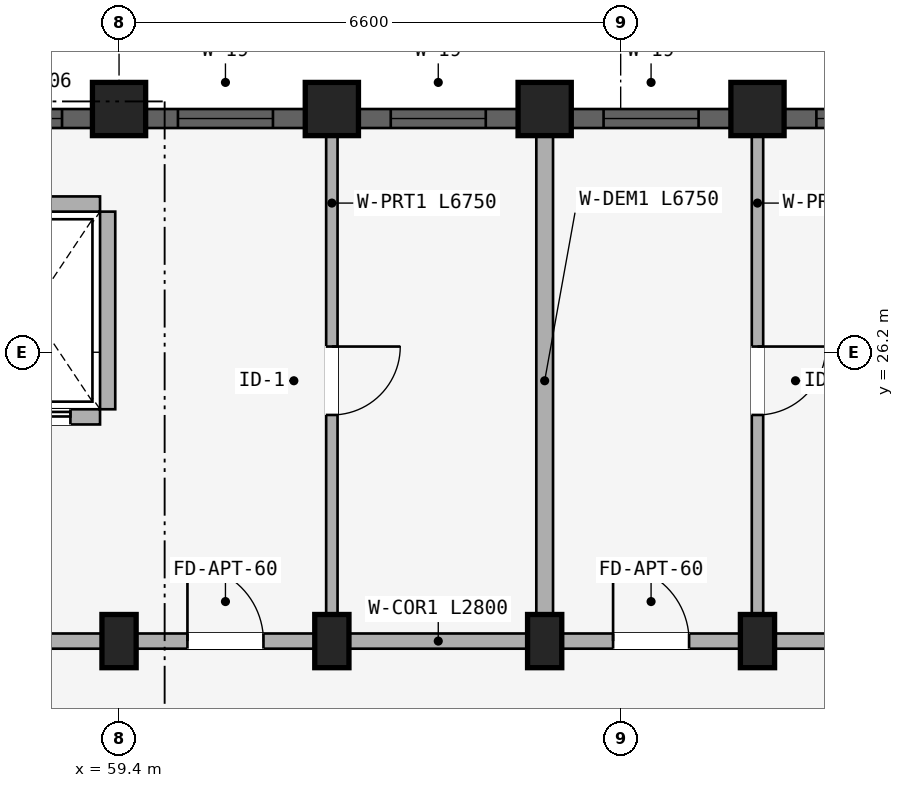
"""IFC4 building model, lengths in metres.
Left out: names, types, materials, properties, quantities, classifications, styles, units other than length and angle.
Written with IfcOpenShell. Run it as: python <this file> out.ifc"""

import sys

from ifc_helpers import new_model, si_unit, direction, frame, frame_2d, origin, origin_2d, place, context, subcontext, project, spatial, rectangle, extrude, element, fill, save


model = new_model("IFC4")
c1 = context("Model", 3, precision=1e-05, world=origin(), true_north=direction((0.0, 1.0)))
c2 = subcontext(c1, "Body", "Model", "MODEL_VIEW")
j1 = project(units=[si_unit("LENGTHUNIT", "METRE"), si_unit("PLANEANGLEUNIT", "RADIAN")], contexts=[c1])
p1 = place(None, origin())
s1 = spatial("IfcSite", under=j1, at=p1, CompositionType="ELEMENT")
p2 = place(p1, origin())
s2 = spatial("IfcBuilding", under=s1, at=p2, CompositionType="ELEMENT")
p3 = place(p2, frame((0.0, 0.0, 24.45)))
s3 = spatial("IfcBuildingStorey", under=s2, at=p3, CompositionType="ELEMENT", Elevation=24.45)
p4 = place(p3, frame((59.4, 29.4, 0.0), z_axis=(0.0, 0.0, 1.0), x_axis=(1.0, 0.0, 0.0)))
e1 = element("IfcColumn", 1, at=p4, inside=s3, PredefinedType="COLUMN", context=c2, shape_type="SweptSolid", body=[
    extrude(rectangle(XDim=0.7, YDim=0.7, at=origin_2d()), origin(), (0.0, 0.0, 1.0), 2.93),
])
p5 = place(p3, frame((59.4, 22.4, 0.0), z_axis=(0.0, 0.0, 1.0), x_axis=(1.0, 0.0, 0.0)))
e2 = element("IfcColumn", 2, at=p5, inside=s3, PredefinedType="COLUMN", context=c2, shape_type="SweptSolid", body=[
    extrude(rectangle(XDim=0.45, YDim=0.7, at=origin_2d()), origin(), (0.0, 0.0, 1.0), 2.93),
])
p6 = place(p3, frame((62.2, 29.4, 0.0), z_axis=(0.0, 0.0, 1.0), x_axis=(1.0, 0.0, 0.0)))
e3 = element("IfcColumn", 3, at=p6, inside=s3, PredefinedType="COLUMN", context=c2, shape_type="SweptSolid", body=[
    extrude(rectangle(XDim=0.7, YDim=0.7, at=origin_2d()), origin(), (0.0, 0.0, 1.0), 2.93),
])
p7 = place(p3, frame((62.2, 22.4, 0.0), z_axis=(0.0, 0.0, 1.0), x_axis=(1.0, 0.0, 0.0)))
e4 = element("IfcColumn", 4, at=p7, inside=s3, PredefinedType="COLUMN", context=c2, shape_type="SweptSolid", body=[
    extrude(rectangle(XDim=0.45, YDim=0.7, at=origin_2d()), origin(), (0.0, 0.0, 1.0), 2.93),
])
p8 = place(p3, frame((65.0, 29.4, 0.0), z_axis=(0.0, 0.0, 1.0), x_axis=(1.0, 0.0, 0.0)))
e5 = element("IfcColumn", 5, at=p8, inside=s3, PredefinedType="COLUMN", context=c2, shape_type="SweptSolid", body=[
    extrude(rectangle(XDim=0.7, YDim=0.7, at=origin_2d()), origin(), (0.0, 0.0, 1.0), 2.93),
])
p9 = place(p3, frame((65.0, 22.4, 0.0), z_axis=(0.0, 0.0, 1.0), x_axis=(1.0, 0.0, 0.0)))
e6 = element("IfcColumn", 6, at=p9, inside=s3, PredefinedType="COLUMN", context=c2, shape_type="SweptSolid", body=[
    extrude(rectangle(XDim=0.45, YDim=0.7, at=origin_2d()), origin(), (0.0, 0.0, 1.0), 2.93),
])
p10 = place(p3, frame((67.8, 29.4, 0.0), z_axis=(0.0, 0.0, 1.0), x_axis=(1.0, 0.0, 0.0)))
e7 = element("IfcColumn", 7, at=p10, inside=s3, PredefinedType="COLUMN", context=c2, shape_type="SweptSolid", body=[
    extrude(rectangle(XDim=0.7, YDim=0.7, at=origin_2d()), origin(), (0.0, 0.0, 1.0), 2.93),
])
p11 = place(p3, frame((67.8, 22.4, 0.0), z_axis=(0.0, 0.0, 1.0), x_axis=(1.0, 0.0, 0.0)))
e8 = element("IfcColumn", 8, at=p11, inside=s3, PredefinedType="COLUMN", context=c2, shape_type="SweptSolid", body=[
    extrude(rectangle(XDim=0.45, YDim=0.7, at=origin_2d()), origin(), (0.0, 0.0, 1.0), 2.93),
])
p12 = place(p3, frame((59.25, 28.05, 0.0), z_axis=(0.0, 0.0, 1.0), x_axis=(0.0, -1.0, 0.0)))
e9 = element("IfcWall", 9, at=p12, inside=s3, PredefinedType="STANDARD", context=c2, shape_type="SweptSolid", body=[
    extrude(rectangle(XDim=2.6, YDim=0.2, at=frame_2d((1.3, 0.0))), origin(), (0.0, 0.0, 1.0), 2.372),
])
p13 = place(p3, frame((57.35, 28.15, 0.0), z_axis=(0.0, 0.0, 1.0), x_axis=(1.0, 0.0, 0.0)))
e10 = element("IfcWall", 10, at=p13, inside=s3, PredefinedType="STANDARD", context=c2, shape_type="SweptSolid", body=[
    extrude(rectangle(XDim=1.8, YDim=0.2, at=frame_2d((0.9, 0.0))), origin(), (0.0, 0.0, 1.0), 2.93),
])
p14 = place(p3, frame((57.35, 25.35, 0.0), z_axis=(0.0, 0.0, 1.0), x_axis=(1.0, 0.0, 0.0)))
e11 = element("IfcWall", 11, at=p14, inside=s3, PredefinedType="STANDARD", context=c2, shape_type="SweptSolid", body=[
    extrude(rectangle(XDim=1.8, YDim=0.2, at=frame_2d((0.9, 0.0))), origin(), (0.0, 0.0, 1.0), 2.93),
])
p15 = place(p14, frame((0.39, 0.0, 0.0)))
e12 = element("IfcOpeningElement", 12, at=p15, cuts=e11, PredefinedType="OPENING", context=c2, shape_type="SweptSolid", body=[
    extrude(rectangle(XDim=1.02, YDim=2.15, at=frame_2d((0.51, 1.075))), frame((0.0, 0.11, 0.0), z_axis=(0.0, -1.0, 0.0), x_axis=(1.0, 0.0, 0.0)), (0.0, 0.0, 1.0), 0.22),
])
p16 = place(p3, frame((53.75, 22.4, 0.0), z_axis=(0.0, 0.0, 1.0), x_axis=(1.0, 0.0, 0.0)))
e13 = element("IfcWall", 13, at=p16, inside=s3, PredefinedType="STANDARD", context=c2, shape_type="SweptSolid", body=[
    extrude(rectangle(XDim=5.6, YDim=0.2, at=frame_2d((2.8, 0.0))), origin(), (0.0, 0.0, 1.0), 2.372),
])
p17 = place(p16, frame((1.91, 0.0, 0.0)))
e14 = element("IfcOpeningElement", 14, at=p17, cuts=e13, PredefinedType="OPENING", context=c2, shape_type="SweptSolid", body=[
    extrude(rectangle(XDim=1.22, YDim=2.15, at=frame_2d((0.61, 1.075))), frame((0.0, 0.11, 0.0), z_axis=(0.0, -1.0, 0.0), x_axis=(1.0, 0.0, 0.0)), (0.0, 0.0, 1.0), 0.22),
])
p18 = place(p3, frame((59.4, 22.4, 0.0), z_axis=(0.0, 0.0, 1.0), x_axis=(1.0, 0.0, 0.0)))
e15 = element("IfcWall", 15, at=p18, inside=s3, PredefinedType="STANDARD", context=c2, shape_type="SweptSolid", body=[
    extrude(rectangle(XDim=2.8, YDim=0.2, at=frame_2d((1.4, 0.0))), origin(), (0.0, 0.0, 1.0), 2.372),
])
p19 = place(p18, frame((0.9, 0.0, 0.0)))
e16 = element("IfcOpeningElement", 16, at=p19, cuts=e15, PredefinedType="OPENING", context=c2, shape_type="SweptSolid", body=[
    extrude(rectangle(XDim=1.0, YDim=2.15, at=frame_2d((0.5, 1.075))), frame((0.0, 0.11, 0.0), z_axis=(0.0, -1.0, 0.0), x_axis=(1.0, 0.0, 0.0)), (0.0, 0.0, 1.0), 0.22),
])
p20 = place(p3, frame((62.2, 22.4, 0.0), z_axis=(0.0, 0.0, 1.0), x_axis=(1.0, 0.0, 0.0)))
e17 = element("IfcWall", 17, at=p20, inside=s3, PredefinedType="STANDARD", context=c2, shape_type="SweptSolid", body=[
    extrude(rectangle(XDim=2.8, YDim=0.2, at=frame_2d((1.4, 0.0))), origin(), (0.0, 0.0, 1.0), 2.372),
])
p21 = place(p3, frame((65.0, 22.4, 0.0), z_axis=(0.0, 0.0, 1.0), x_axis=(1.0, 0.0, 0.0)))
e18 = element("IfcWall", 18, at=p21, inside=s3, PredefinedType="STANDARD", context=c2, shape_type="SweptSolid", body=[
    extrude(rectangle(XDim=2.8, YDim=0.2, at=frame_2d((1.4, 0.0))), origin(), (0.0, 0.0, 1.0), 2.372),
])
p22 = place(p21, frame((0.9, 0.0, 0.0)))
e19 = element("IfcOpeningElement", 19, at=p22, cuts=e18, PredefinedType="OPENING", context=c2, shape_type="SweptSolid", body=[
    extrude(rectangle(XDim=1.0, YDim=2.15, at=frame_2d((0.5, 1.075))), frame((0.0, 0.11, 0.0), z_axis=(0.0, -1.0, 0.0), x_axis=(1.0, 0.0, 0.0)), (0.0, 0.0, 1.0), 0.22),
])
p23 = place(p3, frame((67.8, 22.4, 0.0), z_axis=(0.0, 0.0, 1.0), x_axis=(1.0, 0.0, 0.0)))
e20 = element("IfcWall", 20, at=p23, inside=s3, PredefinedType="STANDARD", context=c2, shape_type="SweptSolid", body=[
    extrude(rectangle(XDim=2.8, YDim=0.2, at=frame_2d((1.4, 0.0))), origin(), (0.0, 0.0, 1.0), 2.372),
])
p24 = place(p3, frame((62.2, 29.2, 0.0), z_axis=(0.0, 0.0, 1.0), x_axis=(0.0, -1.0, 0.0)))
e21 = element("IfcWall", 21, at=p24, inside=s3, PredefinedType="PARTITIONING", context=c2, shape_type="SweptSolid", body=[
    extrude(rectangle(XDim=6.75, YDim=0.15, at=frame_2d((3.375, 0.0))), origin(), (0.0, 0.0, 1.0), 2.372),
])
p25 = place(p24, frame((2.925, 0.0, 0.0)))
e22 = element("IfcOpeningElement", 22, at=p25, cuts=e21, PredefinedType="OPENING", context=c2, shape_type="SweptSolid", body=[
    extrude(rectangle(XDim=0.9, YDim=2.1, at=frame_2d((0.45, 1.05))), frame((0.0, 0.085, 0.0), z_axis=(0.0, -1.0, 0.0), x_axis=(1.0, 0.0, 0.0)), (0.0, 0.0, 1.0), 0.17),
])
p26 = place(p3, frame((65.0, 29.2, 0.0), z_axis=(0.0, 0.0, 1.0), x_axis=(0.0, -1.0, 0.0)))
e23 = element("IfcWall", 23, at=p26, inside=s3, PredefinedType="STANDARD", context=c2, shape_type="SweptSolid", body=[
    extrude(rectangle(XDim=6.75, YDim=0.22, at=frame_2d((3.375, 0.0))), origin(), (0.0, 0.0, 1.0), 2.372),
])
p27 = place(p3, frame((67.8, 29.2, 0.0), z_axis=(0.0, 0.0, 1.0), x_axis=(0.0, -1.0, 0.0)))
e24 = element("IfcWall", 24, at=p27, inside=s3, PredefinedType="PARTITIONING", context=c2, shape_type="SweptSolid", body=[
    extrude(rectangle(XDim=6.75, YDim=0.15, at=frame_2d((3.375, 0.0))), origin(), (0.0, 0.0, 1.0), 2.372),
])
p28 = place(p27, frame((2.925, 0.0, 0.0)))
e25 = element("IfcOpeningElement", 25, at=p28, cuts=e24, PredefinedType="OPENING", context=c2, shape_type="SweptSolid", body=[
    extrude(rectangle(XDim=0.9, YDim=2.1, at=frame_2d((0.45, 1.05))), frame((0.0, 0.085, 0.0), z_axis=(0.0, -1.0, 0.0), x_axis=(1.0, 0.0, 0.0)), (0.0, 0.0, 1.0), 0.17),
])
p29 = place(p3, frame((56.628, 29.275, 0.0), z_axis=(0.0, 0.0, 1.0), x_axis=(1.0, 0.0, 0.0)))
e26 = element("IfcWall", 26, at=p29, inside=s3, PredefinedType="STANDARD", context=c2, shape_type="SweptSolid", body=[
    extrude(rectangle(XDim=2.422, YDim=0.25, at=frame_2d((1.211, 0.0))), origin(), (0.0, 0.0, 1.0), 2.472),
])
p30 = place(p29, frame((0.822, 0.0, 0.772)))
e27 = element("IfcOpeningElement", 27, at=p30, cuts=e26, PredefinedType="OPENING", context=c2, shape_type="SweptSolid", body=[
    extrude(rectangle(XDim=1.2, YDim=1.5, at=frame_2d((0.6, 0.75))), frame((0.0, 0.135, 0.0), z_axis=(0.0, -1.0, 0.0), x_axis=(1.0, 0.0, 0.0)), (0.0, 0.0, 1.0), 0.27),
])
p31 = place(p3, frame((59.753, 29.275, 0.0), z_axis=(0.0, 0.0, 1.0), x_axis=(1.0, 0.0, 0.0)))
e28 = element("IfcWall", 28, at=p31, inside=s3, PredefinedType="STANDARD", context=c2, shape_type="SweptSolid", body=[
    extrude(rectangle(XDim=2.093, YDim=0.25, at=frame_2d((1.046, 0.0))), origin(), (0.0, 0.0, 1.0), 2.472),
])
p32 = place(p31, frame((0.421, 0.0, 0.722)))
e29 = element("IfcOpeningElement", 29, at=p32, cuts=e28, PredefinedType="OPENING", context=c2, shape_type="SweptSolid", body=[
    extrude(rectangle(XDim=1.25, YDim=1.55, at=frame_2d((0.625, 0.775))), frame((0.0, 0.135, 0.0), z_axis=(0.0, -1.0, 0.0), x_axis=(1.0, 0.0, 0.0)), (0.0, 0.0, 1.0), 0.27),
])
p33 = place(p3, frame((62.553, 29.275, 0.0), z_axis=(0.0, 0.0, 1.0), x_axis=(1.0, 0.0, 0.0)))
e30 = element("IfcWall", 30, at=p33, inside=s3, PredefinedType="STANDARD", context=c2, shape_type="SweptSolid", body=[
    extrude(rectangle(XDim=2.093, YDim=0.25, at=frame_2d((1.046, 0.0))), origin(), (0.0, 0.0, 1.0), 2.472),
])
p34 = place(p33, frame((0.421, 0.0, 0.722)))
e31 = element("IfcOpeningElement", 31, at=p34, cuts=e30, PredefinedType="OPENING", context=c2, shape_type="SweptSolid", body=[
    extrude(rectangle(XDim=1.25, YDim=1.55, at=frame_2d((0.625, 0.775))), frame((0.0, 0.135, 0.0), z_axis=(0.0, -1.0, 0.0), x_axis=(1.0, 0.0, 0.0)), (0.0, 0.0, 1.0), 0.27),
])
p35 = place(p3, frame((65.354, 29.275, 0.0), z_axis=(0.0, 0.0, 1.0), x_axis=(1.0, 0.0, 0.0)))
e32 = element("IfcWall", 32, at=p35, inside=s3, PredefinedType="STANDARD", context=c2, shape_type="SweptSolid", body=[
    extrude(rectangle(XDim=2.093, YDim=0.25, at=frame_2d((1.046, 0.0))), origin(), (0.0, 0.0, 1.0), 2.472),
])
p36 = place(p35, frame((0.421, 0.0, 0.722)))
e33 = element("IfcOpeningElement", 33, at=p36, cuts=e32, PredefinedType="OPENING", context=c2, shape_type="SweptSolid", body=[
    extrude(rectangle(XDim=1.25, YDim=1.55, at=frame_2d((0.625, 0.775))), frame((0.0, 0.135, 0.0), z_axis=(0.0, -1.0, 0.0), x_axis=(1.0, 0.0, 0.0)), (0.0, 0.0, 1.0), 0.27),
])
p37 = place(p3, frame((68.154, 29.275, 0.0), z_axis=(0.0, 0.0, 1.0), x_axis=(1.0, 0.0, 0.0)))
e34 = element("IfcWall", 34, at=p37, inside=s3, PredefinedType="STANDARD", context=c2, shape_type="SweptSolid", body=[
    extrude(rectangle(XDim=2.093, YDim=0.25, at=frame_2d((1.046, 0.0))), origin(), (0.0, 0.0, 1.0), 2.472),
])
p38 = place(p37, frame((0.421, 0.0, 0.722)))
e35 = element("IfcOpeningElement", 35, at=p38, cuts=e34, PredefinedType="OPENING", context=c2, shape_type="SweptSolid", body=[
    extrude(rectangle(XDim=1.25, YDim=1.55, at=frame_2d((0.625, 0.775))), frame((0.0, 0.135, 0.0), z_axis=(0.0, -1.0, 0.0), x_axis=(1.0, 0.0, 0.0)), (0.0, 0.0, 1.0), 0.27),
])
p39 = place(p30, origin())
e36 = element("IfcWindow", 36, at=p39, inside=s3, PartitioningType="SINGLE_PANEL", PredefinedType="WINDOW", context=c2, shape_type="SweptSolid", body=[
    extrude(rectangle(XDim=1.2, YDim=1.5, at=frame_2d((0.6, 0.75))), frame((0.0, 0.03, 0.0), z_axis=(0.0, -1.0, 0.0), x_axis=(1.0, 0.0, 0.0)), (0.0, 0.0, 1.0), 0.06),
])
fill(e27, e36)
p40 = place(p32, origin())
e37 = element("IfcWindow", 37, at=p40, inside=s3, PartitioningType="SINGLE_PANEL", PredefinedType="WINDOW", context=c2, shape_type="SweptSolid", body=[
    extrude(rectangle(XDim=1.25, YDim=1.55, at=frame_2d((0.625, 0.775))), frame((0.0, 0.03, 0.0), z_axis=(0.0, -1.0, 0.0), x_axis=(1.0, 0.0, 0.0)), (0.0, 0.0, 1.0), 0.06),
])
fill(e29, e37)
p41 = place(p34, origin())
e38 = element("IfcWindow", 38, at=p41, inside=s3, PartitioningType="SINGLE_PANEL", PredefinedType="WINDOW", context=c2, shape_type="SweptSolid", body=[
    extrude(rectangle(XDim=1.25, YDim=1.55, at=frame_2d((0.625, 0.775))), frame((0.0, 0.03, 0.0), z_axis=(0.0, -1.0, 0.0), x_axis=(1.0, 0.0, 0.0)), (0.0, 0.0, 1.0), 0.06),
])
fill(e31, e38)
p42 = place(p36, origin())
e39 = element("IfcWindow", 39, at=p42, inside=s3, PartitioningType="SINGLE_PANEL", PredefinedType="WINDOW", context=c2, shape_type="SweptSolid", body=[
    extrude(rectangle(XDim=1.25, YDim=1.55, at=frame_2d((0.625, 0.775))), frame((0.0, 0.03, 0.0), z_axis=(0.0, -1.0, 0.0), x_axis=(1.0, 0.0, 0.0)), (0.0, 0.0, 1.0), 0.06),
])
fill(e33, e39)
p43 = place(p38, origin())
e40 = element("IfcWindow", 40, at=p43, inside=s3, PartitioningType="SINGLE_PANEL", PredefinedType="WINDOW", context=c2, shape_type="SweptSolid", body=[
    extrude(rectangle(XDim=1.25, YDim=1.55, at=frame_2d((0.625, 0.775))), frame((0.0, 0.03, 0.0), z_axis=(0.0, -1.0, 0.0), x_axis=(1.0, 0.0, 0.0)), (0.0, 0.0, 1.0), 0.06),
])
fill(e35, e40)
p44 = place(p15, origin())
e41 = element("IfcDoor", 41, at=p44, inside=s3, OperationType="SLIDING_TO_RIGHT", PredefinedType="DOOR", context=c2, shape_type="SweptSolid", body=[
    extrude(rectangle(XDim=1.02, YDim=2.15, at=frame_2d((0.51, 1.075))), frame((0.0, 0.025, 0.0), z_axis=(0.0, -1.0, 0.0), x_axis=(1.0, 0.0, 0.0)), (0.0, 0.0, 1.0), 0.05),
])
fill(e12, e41)
p45 = place(p19, frame((1.0, 0.0, 0.0), z_axis=(0.0, 0.0, 1.0), x_axis=(-1.0, 0.0, 0.0)))
e42 = element("IfcDoor", 42, at=p45, inside=s3, OperationType="SINGLE_SWING_RIGHT", PredefinedType="DOOR", context=c2, shape_type="SweptSolid", body=[
    extrude(rectangle(XDim=1.0, YDim=2.15, at=frame_2d((0.5, 1.075))), frame((0.0, 0.025, 0.0), z_axis=(0.0, -1.0, 0.0), x_axis=(1.0, 0.0, 0.0)), (0.0, 0.0, 1.0), 0.05),
])
fill(e16, e42)
p46 = place(p22, frame((1.0, 0.0, 0.0), z_axis=(0.0, 0.0, 1.0), x_axis=(-1.0, 0.0, 0.0)))
e43 = element("IfcDoor", 43, at=p46, inside=s3, OperationType="SINGLE_SWING_RIGHT", PredefinedType="DOOR", context=c2, shape_type="SweptSolid", body=[
    extrude(rectangle(XDim=1.0, YDim=2.15, at=frame_2d((0.5, 1.075))), frame((0.0, 0.025, 0.0), z_axis=(0.0, -1.0, 0.0), x_axis=(1.0, 0.0, 0.0)), (0.0, 0.0, 1.0), 0.05),
])
fill(e19, e43)
p47 = place(p25, origin())
e44 = element("IfcDoor", 44, at=p47, inside=s3, OperationType="SINGLE_SWING_LEFT", PredefinedType="DOOR", context=c2, shape_type="SweptSolid", body=[
    extrude(rectangle(XDim=0.9, YDim=2.1, at=frame_2d((0.45, 1.05))), frame((0.0, 0.025, 0.0), z_axis=(0.0, -1.0, 0.0), x_axis=(1.0, 0.0, 0.0)), (0.0, 0.0, 1.0), 0.05),
])
fill(e22, e44)
p48 = place(p28, frame((0.9, 0.0, 0.0), z_axis=(0.0, 0.0, 1.0), x_axis=(-1.0, 0.0, 0.0)))
e45 = element("IfcDoor", 45, at=p48, inside=s3, OperationType="SINGLE_SWING_RIGHT", PredefinedType="DOOR", context=c2, shape_type="SweptSolid", body=[
    extrude(rectangle(XDim=0.9, YDim=2.1, at=frame_2d((0.45, 1.05))), frame((0.0, 0.025, 0.0), z_axis=(0.0, -1.0, 0.0), x_axis=(1.0, 0.0, 0.0)), (0.0, 0.0, 1.0), 0.05),
])
fill(e25, e45)
save(model, sys.argv[1])
